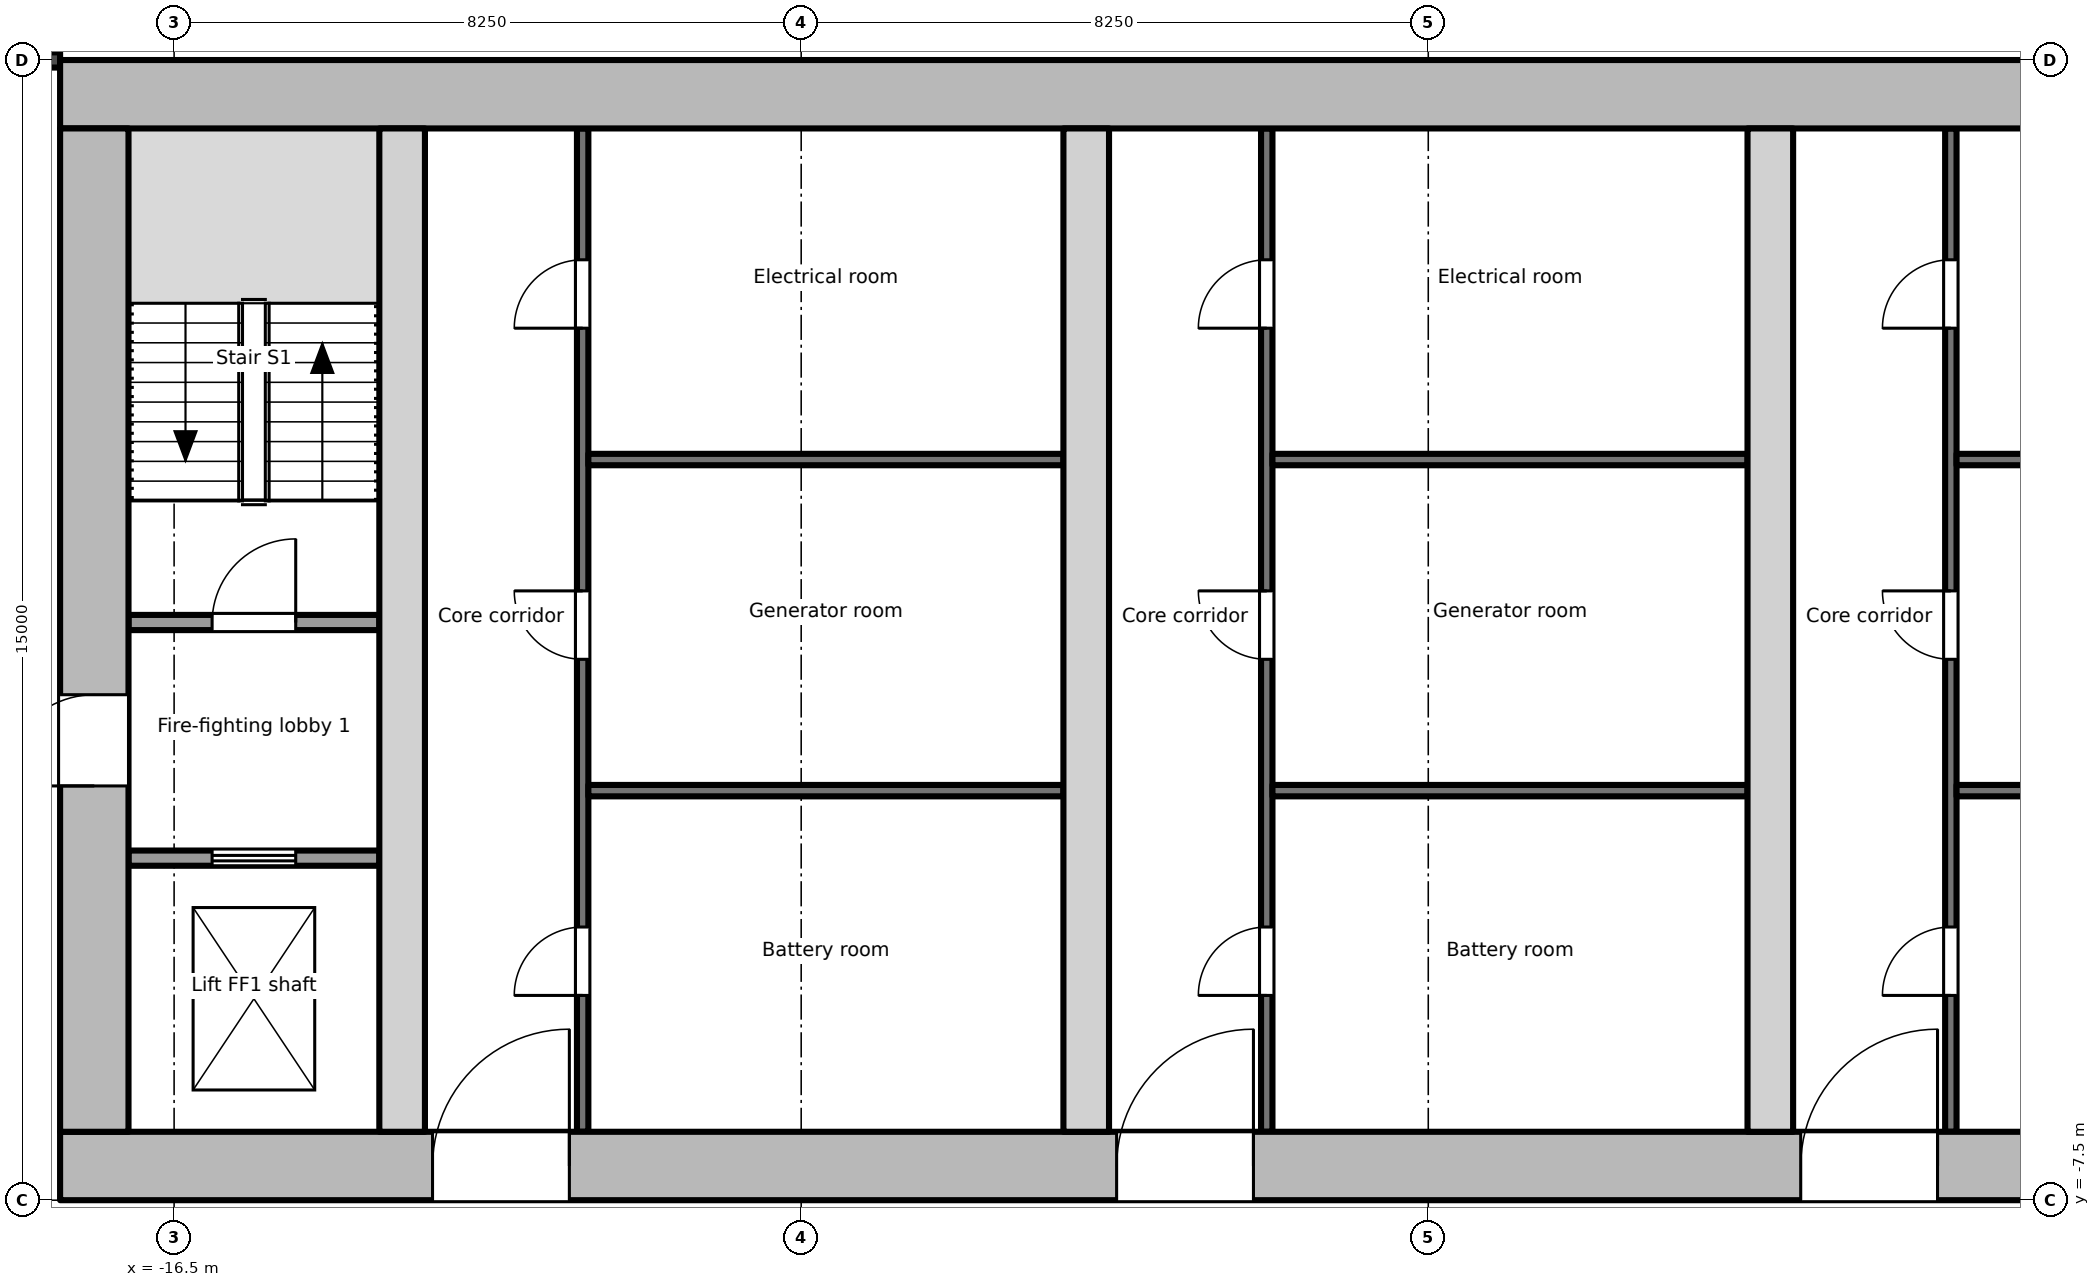
"""IFC4 building model, lengths in metres.
Left out: names, types, materials, properties, quantities, classifications, styles, units other than length and angle.
Written with IfcOpenShell. Run it as: python <this file> out.ifc"""

import sys

from ifc_helpers import new_model, si_unit, direction, frame, frame_2d, origin, place, context, subcontext, project, spatial, rectangle, extrude, element, fill, save


model = new_model("IFC4")
c1 = context("Model", 3, precision=1e-05, world=origin(), true_north=direction((0.0, 1.0)))
c2 = subcontext(c1, "Body", "Model", "MODEL_VIEW")
j1 = project(units=[si_unit("LENGTHUNIT", "METRE"), si_unit("PLANEANGLEUNIT", "RADIAN")], contexts=[c1])
p1 = place(None, origin())
s1 = spatial("IfcSite", under=j1, at=p1, CompositionType="ELEMENT")
p2 = place(p1, origin())
s2 = spatial("IfcBuilding", under=s1, at=p2, CompositionType="ELEMENT")
p3 = place(p2, frame((0.0, 0.0, 312.3)))
s3 = spatial("IfcBuildingStorey", under=s2, at=p3, CompositionType="ELEMENT", Elevation=312.3)
p4 = place(p3, frame((-18.0, -7.05, -0.2), z_axis=(0.0, 0.0, 1.0), x_axis=(1.0, 0.0, 0.0)))
e1 = element("IfcWall", 1, at=p4, inside=s3, PredefinedType="SHEAR", context=c2, shape_type="SweptSolid", body=[
    extrude(rectangle(XDim=36.0, YDim=0.9, at=frame_2d((18.0, 0.0))), origin(), (0.0, 0.0, 1.0), 3.95),
])
p5 = place(p4, frame((4.9, 0.0, 0.2)))
e2 = element("IfcOpeningElement", 2, at=p5, cuts=e1, PredefinedType="OPENING", context=c2, shape_type="SweptSolid", body=[
    extrude(rectangle(XDim=1.8, YDim=2.1, at=frame_2d((0.9, 1.05))), frame((0.0, 0.46, 0.0), z_axis=(0.0, -1.0, 0.0), x_axis=(1.0, 0.0, 0.0)), (0.0, 0.0, 1.0), 0.921),
])
p6 = place(p4, frame((13.9, 0.0, 0.2)))
e3 = element("IfcOpeningElement", 3, at=p6, cuts=e1, PredefinedType="OPENING", context=c2, shape_type="SweptSolid", body=[
    extrude(rectangle(XDim=1.8, YDim=2.1, at=frame_2d((0.9, 1.05))), frame((0.0, 0.46, 0.0), z_axis=(0.0, -1.0, 0.0), x_axis=(1.0, 0.0, 0.0)), (0.0, 0.0, 1.0), 0.921),
])
p7 = place(p4, frame((22.9, 0.0, 0.2)))
e4 = element("IfcOpeningElement", 4, at=p7, cuts=e1, PredefinedType="OPENING", context=c2, shape_type="SweptSolid", body=[
    extrude(rectangle(XDim=1.8, YDim=2.1, at=frame_2d((0.9, 1.05))), frame((0.0, 0.46, 0.0), z_axis=(0.0, -1.0, 0.0), x_axis=(1.0, 0.0, 0.0)), (0.0, 0.0, 1.0), 0.921),
])
p8 = place(p3, frame((-18.0, 7.05, -0.2), z_axis=(0.0, 0.0, 1.0), x_axis=(1.0, 0.0, 0.0)))
e5 = element("IfcWall", 5, at=p8, inside=s3, PredefinedType="SHEAR", context=c2, shape_type="SweptSolid", body=[
    extrude(rectangle(XDim=36.0, YDim=0.9, at=frame_2d((18.0, 0.0))), origin(), (0.0, 0.0, 1.0), 3.95),
])
p9 = place(p3, frame((-17.55, -6.6, -0.2), z_axis=(0.0, 0.0, 1.0), x_axis=(0.0, 1.0, 0.0)))
e6 = element("IfcWall", 6, at=p9, inside=s3, PredefinedType="SHEAR", context=c2, shape_type="SweptSolid", body=[
    extrude(rectangle(XDim=13.2, YDim=0.9, at=frame_2d((6.6, 0.0))), origin(), (0.0, 0.0, 1.0), 3.95),
])
p10 = place(p9, frame((4.55, 0.0, 0.2)))
e7 = element("IfcOpeningElement", 7, at=p10, cuts=e6, PredefinedType="OPENING", context=c2, shape_type="SweptSolid", body=[
    extrude(rectangle(XDim=1.2, YDim=2.1, at=frame_2d((0.6, 1.05))), frame((0.0, 0.46, 0.0), z_axis=(0.0, -1.0, 0.0), x_axis=(1.0, 0.0, 0.0)), (0.0, 0.0, 1.0), 0.921),
])
for number, where, z_axis, x_axis in (
    (8, (-13.5, -6.6, -0.2), (0.0, 0.0, 1.0), (0.0, 1.0, 0.0)),
    (9, (-4.5, -6.6, -0.2), (0.0, 0.0, 1.0), (0.0, 1.0, 0.0)),
    (10, (4.5, -6.6, -0.2), (0.0, 0.0, 1.0), (0.0, 1.0, 0.0)),
):
    element("IfcWall", number, at=place(p3, frame(where, z_axis=z_axis, x_axis=x_axis)), inside=s3, PredefinedType="SHEAR", context=c2, shape_type="SweptSolid", body=[
        extrude(rectangle(XDim=13.2, YDim=0.6, at=frame_2d((6.6, 0.0))), origin(), (0.0, 0.0, 1.0), 3.95),
    ])
p11 = place(p3, frame((-17.1, -3.0, 0.0), z_axis=(0.0, 0.0, 1.0), x_axis=(1.0, 0.0, 0.0)))
e11 = element("IfcWall", 11, at=p11, inside=s3, PredefinedType="PARTITIONING", context=c2, shape_type="SweptSolid", body=[
    extrude(rectangle(XDim=3.3, YDim=0.2, at=frame_2d((1.65, 0.0))), origin(), (0.0, 0.0, 1.0), 3.75),
])
p12 = place(p11, frame((1.1, 0.0, 0.0)))
e12 = element("IfcOpeningElement", 12, at=p12, cuts=e11, PredefinedType="OPENING", context=c2, shape_type="SweptSolid", body=[
    extrude(rectangle(XDim=1.1, YDim=2.1, at=frame_2d((0.55, 1.05))), frame((0.0, 0.111, 0.0), z_axis=(0.0, -1.0, 0.0), x_axis=(1.0, 0.0, 0.0)), (0.0, 0.0, 1.0), 0.221),
])
p13 = place(p3, frame((-17.1, 0.1, 0.0), z_axis=(0.0, 0.0, 1.0), x_axis=(1.0, 0.0, 0.0)))
e13 = element("IfcWall", 13, at=p13, inside=s3, PredefinedType="PARTITIONING", context=c2, shape_type="SweptSolid", body=[
    extrude(rectangle(XDim=3.3, YDim=0.2, at=frame_2d((1.65, 0.0))), origin(), (0.0, 0.0, 1.0), 3.75),
])
p14 = place(p13, frame((1.1, 0.0, 0.0)))
e14 = element("IfcOpeningElement", 14, at=p14, cuts=e13, PredefinedType="OPENING", context=c2, shape_type="SweptSolid", body=[
    extrude(rectangle(XDim=1.1, YDim=2.1, at=frame_2d((0.55, 1.05))), frame((0.0, 0.111, 0.0), z_axis=(0.0, -1.0, 0.0), x_axis=(1.0, 0.0, 0.0)), (0.0, 0.0, 1.0), 0.221),
])
p15 = place(p3, frame((-11.125, -6.6, 0.0), z_axis=(0.0, 0.0, 1.0), x_axis=(0.0, 1.0, 0.0)))
e15 = element("IfcWall", 15, at=p15, inside=s3, PredefinedType="PARTITIONING", context=c2, shape_type="SweptSolid", body=[
    extrude(rectangle(XDim=13.2, YDim=0.15, at=frame_2d((6.6, 0.0))), origin(), (0.0, 0.0, 1.0), 3.75),
])
p16 = place(p15, frame((1.794, 0.0, 0.0)))
e16 = element("IfcOpeningElement", 16, at=p16, cuts=e15, PredefinedType="OPENING", context=c2, shape_type="SweptSolid", body=[
    extrude(rectangle(XDim=0.9, YDim=2.1, at=frame_2d((0.45, 1.05))), frame((0.0, 0.085, 0.0), z_axis=(0.0, -1.0, 0.0), x_axis=(1.0, 0.0, 0.0)), (0.0, 0.0, 1.0), 0.171),
])
p17 = place(p15, frame((6.216, 0.0, 0.0)))
e17 = element("IfcOpeningElement", 17, at=p17, cuts=e15, PredefinedType="OPENING", context=c2, shape_type="SweptSolid", body=[
    extrude(rectangle(XDim=0.9, YDim=2.1, at=frame_2d((0.45, 1.05))), frame((0.0, 0.085, 0.0), z_axis=(0.0, -1.0, 0.0), x_axis=(1.0, 0.0, 0.0)), (0.0, 0.0, 1.0), 0.171),
])
p18 = place(p15, frame((10.572, 0.0, 0.0)))
e18 = element("IfcOpeningElement", 18, at=p18, cuts=e15, PredefinedType="OPENING", context=c2, shape_type="SweptSolid", body=[
    extrude(rectangle(XDim=0.9, YDim=2.1, at=frame_2d((0.45, 1.05))), frame((0.0, 0.085, 0.0), z_axis=(0.0, -1.0, 0.0), x_axis=(1.0, 0.0, 0.0)), (0.0, 0.0, 1.0), 0.171),
])
for number, where, z_axis, x_axis in (
    (19, (-11.05, -2.112, 0.0), (0.0, 0.0, 1.0), (1.0, 0.0, 0.0)),
    (20, (-11.05, 2.244, 0.0), (0.0, 0.0, 1.0), (1.0, 0.0, 0.0)),
):
    element("IfcWall", number, at=place(p3, frame(where, z_axis=z_axis, x_axis=x_axis)), inside=s3, PredefinedType="PARTITIONING", context=c2, shape_type="SweptSolid", body=[
        extrude(rectangle(XDim=6.25, YDim=0.15, at=frame_2d((3.125, 0.0))), origin(), (0.0, 0.0, 1.0), 3.75),
    ])
p19 = place(p3, frame((-2.125, -6.6, 0.0), z_axis=(0.0, 0.0, 1.0), x_axis=(0.0, 1.0, 0.0)))
e21 = element("IfcWall", 21, at=p19, inside=s3, PredefinedType="PARTITIONING", context=c2, shape_type="SweptSolid", body=[
    extrude(rectangle(XDim=13.2, YDim=0.15, at=frame_2d((6.6, 0.0))), origin(), (0.0, 0.0, 1.0), 3.75),
])
p20 = place(p19, frame((1.794, 0.0, 0.0)))
e22 = element("IfcOpeningElement", 22, at=p20, cuts=e21, PredefinedType="OPENING", context=c2, shape_type="SweptSolid", body=[
    extrude(rectangle(XDim=0.9, YDim=2.1, at=frame_2d((0.45, 1.05))), frame((0.0, 0.085, 0.0), z_axis=(0.0, -1.0, 0.0), x_axis=(1.0, 0.0, 0.0)), (0.0, 0.0, 1.0), 0.171),
])
p21 = place(p19, frame((6.216, 0.0, 0.0)))
e23 = element("IfcOpeningElement", 23, at=p21, cuts=e21, PredefinedType="OPENING", context=c2, shape_type="SweptSolid", body=[
    extrude(rectangle(XDim=0.9, YDim=2.1, at=frame_2d((0.45, 1.05))), frame((0.0, 0.085, 0.0), z_axis=(0.0, -1.0, 0.0), x_axis=(1.0, 0.0, 0.0)), (0.0, 0.0, 1.0), 0.171),
])
p22 = place(p19, frame((10.572, 0.0, 0.0)))
e24 = element("IfcOpeningElement", 24, at=p22, cuts=e21, PredefinedType="OPENING", context=c2, shape_type="SweptSolid", body=[
    extrude(rectangle(XDim=0.9, YDim=2.1, at=frame_2d((0.45, 1.05))), frame((0.0, 0.085, 0.0), z_axis=(0.0, -1.0, 0.0), x_axis=(1.0, 0.0, 0.0)), (0.0, 0.0, 1.0), 0.171),
])
for number, where, z_axis, x_axis in (
    (25, (-2.05, -2.112, 0.0), (0.0, 0.0, 1.0), (1.0, 0.0, 0.0)),
    (26, (-2.05, 2.244, 0.0), (0.0, 0.0, 1.0), (1.0, 0.0, 0.0)),
):
    element("IfcWall", number, at=place(p3, frame(where, z_axis=z_axis, x_axis=x_axis)), inside=s3, PredefinedType="PARTITIONING", context=c2, shape_type="SweptSolid", body=[
        extrude(rectangle(XDim=6.25, YDim=0.15, at=frame_2d((3.125, 0.0))), origin(), (0.0, 0.0, 1.0), 3.75),
    ])
p23 = place(p3, frame((6.875, -6.6, 0.0), z_axis=(0.0, 0.0, 1.0), x_axis=(0.0, 1.0, 0.0)))
e27 = element("IfcWall", 27, at=p23, inside=s3, PredefinedType="PARTITIONING", context=c2, shape_type="SweptSolid", body=[
    extrude(rectangle(XDim=13.2, YDim=0.15, at=frame_2d((6.6, 0.0))), origin(), (0.0, 0.0, 1.0), 3.75),
])
p24 = place(p23, frame((1.794, 0.0, 0.0)))
e28 = element("IfcOpeningElement", 28, at=p24, cuts=e27, PredefinedType="OPENING", context=c2, shape_type="SweptSolid", body=[
    extrude(rectangle(XDim=0.9, YDim=2.1, at=frame_2d((0.45, 1.05))), frame((0.0, 0.085, 0.0), z_axis=(0.0, -1.0, 0.0), x_axis=(1.0, 0.0, 0.0)), (0.0, 0.0, 1.0), 0.171),
])
p25 = place(p23, frame((6.216, 0.0, 0.0)))
e29 = element("IfcOpeningElement", 29, at=p25, cuts=e27, PredefinedType="OPENING", context=c2, shape_type="SweptSolid", body=[
    extrude(rectangle(XDim=0.9, YDim=2.1, at=frame_2d((0.45, 1.05))), frame((0.0, 0.085, 0.0), z_axis=(0.0, -1.0, 0.0), x_axis=(1.0, 0.0, 0.0)), (0.0, 0.0, 1.0), 0.171),
])
p26 = place(p23, frame((10.572, 0.0, 0.0)))
e30 = element("IfcOpeningElement", 30, at=p26, cuts=e27, PredefinedType="OPENING", context=c2, shape_type="SweptSolid", body=[
    extrude(rectangle(XDim=0.9, YDim=2.1, at=frame_2d((0.45, 1.05))), frame((0.0, 0.085, 0.0), z_axis=(0.0, -1.0, 0.0), x_axis=(1.0, 0.0, 0.0)), (0.0, 0.0, 1.0), 0.171),
])
for number, where, z_axis, x_axis in (
    (31, (6.95, -2.112, 0.0), (0.0, 0.0, 1.0), (1.0, 0.0, 0.0)),
    (32, (6.95, 2.244, 0.0), (0.0, 0.0, 1.0), (1.0, 0.0, 0.0)),
):
    element("IfcWall", number, at=place(p3, frame(where, z_axis=z_axis, x_axis=x_axis)), inside=s3, PredefinedType="PARTITIONING", context=c2, shape_type="SweptSolid", body=[
        extrude(rectangle(XDim=6.25, YDim=0.15, at=frame_2d((3.125, 0.0))), origin(), (0.0, 0.0, 1.0), 3.75),
    ])
p27 = place(p3, frame((-20.6, 7.501, 0.0), z_axis=(0.0, 0.0, 1.0), x_axis=(1.0, 0.0, 0.0)))
e33 = element("IfcWall", 33, at=p27, inside=s3, PredefinedType="PARTITIONING", context=c2, shape_type="SweptSolid", body=[
    extrude(rectangle(XDim=2.6, YDim=0.2, at=frame_2d((1.3, 0.0))), origin(), (0.0, 0.0, 1.0), 3.75),
])
p28 = place(p12, origin())
e34 = element("IfcDoor", 34, at=p28, inside=s3, OperationType="DOUBLE_DOOR_SLIDING", PredefinedType="DOOR", context=c2, shape_type="SweptSolid", body=[
    extrude(rectangle(XDim=1.1, YDim=2.1, at=frame_2d((0.55, 1.05))), frame((0.0, 0.025, 0.0), z_axis=(0.0, -1.0, 0.0), x_axis=(1.0, 0.0, 0.0)), (0.0, 0.0, 1.0), 0.05),
])
fill(e12, e34)
p29 = place(p10, origin())
e35 = element("IfcDoor", 35, at=p29, inside=s3, OperationType="SINGLE_SWING_LEFT", PredefinedType="DOOR", context=c2, shape_type="SweptSolid", body=[
    extrude(rectangle(XDim=1.2, YDim=2.1, at=frame_2d((0.6, 1.05))), frame((0.0, 0.025, 0.0), z_axis=(0.0, -1.0, 0.0), x_axis=(1.0, 0.0, 0.0)), (0.0, 0.0, 1.0), 0.05),
])
fill(e7, e35)
p30 = place(p14, origin())
e36 = element("IfcDoor", 36, at=p30, inside=s3, OperationType="SINGLE_SWING_RIGHT", PredefinedType="DOOR", context=c2, shape_type="SweptSolid", body=[
    extrude(rectangle(XDim=1.1, YDim=2.1, at=frame_2d((0.55, 1.05))), frame((0.0, 0.025, 0.0), z_axis=(0.0, -1.0, 0.0), x_axis=(1.0, 0.0, 0.0)), (0.0, 0.0, 1.0), 0.05),
])
fill(e14, e36)
p31 = place(p16, origin())
e37 = element("IfcDoor", 37, at=p31, inside=s3, OperationType="SINGLE_SWING_LEFT", PredefinedType="DOOR", context=c2, shape_type="SweptSolid", body=[
    extrude(rectangle(XDim=0.9, YDim=2.1, at=frame_2d((0.45, 1.05))), frame((0.0, 0.025, 0.0), z_axis=(0.0, -1.0, 0.0), x_axis=(1.0, 0.0, 0.0)), (0.0, 0.0, 1.0), 0.05),
])
fill(e16, e37)
p32 = place(p17, origin())
e38 = element("IfcDoor", 38, at=p32, inside=s3, OperationType="SINGLE_SWING_RIGHT", PredefinedType="DOOR", context=c2, shape_type="SweptSolid", body=[
    extrude(rectangle(XDim=0.9, YDim=2.1, at=frame_2d((0.45, 1.05))), frame((0.0, 0.025, 0.0), z_axis=(0.0, -1.0, 0.0), x_axis=(1.0, 0.0, 0.0)), (0.0, 0.0, 1.0), 0.05),
])
fill(e17, e38)
p33 = place(p18, origin())
e39 = element("IfcDoor", 39, at=p33, inside=s3, OperationType="SINGLE_SWING_LEFT", PredefinedType="DOOR", context=c2, shape_type="SweptSolid", body=[
    extrude(rectangle(XDim=0.9, YDim=2.1, at=frame_2d((0.45, 1.05))), frame((0.0, 0.025, 0.0), z_axis=(0.0, -1.0, 0.0), x_axis=(1.0, 0.0, 0.0)), (0.0, 0.0, 1.0), 0.05),
])
fill(e18, e39)
p34 = place(p5, origin())
e40 = element("IfcDoor", 40, at=p34, inside=s3, OperationType="SINGLE_SWING_RIGHT", PredefinedType="DOOR", context=c2, shape_type="SweptSolid", body=[
    extrude(rectangle(XDim=1.8, YDim=2.1, at=frame_2d((0.9, 1.05))), frame((0.0, 0.025, 0.0), z_axis=(0.0, -1.0, 0.0), x_axis=(1.0, 0.0, 0.0)), (0.0, 0.0, 1.0), 0.05),
])
fill(e2, e40)
p35 = place(p20, origin())
e41 = element("IfcDoor", 41, at=p35, inside=s3, OperationType="SINGLE_SWING_LEFT", PredefinedType="DOOR", context=c2, shape_type="SweptSolid", body=[
    extrude(rectangle(XDim=0.9, YDim=2.1, at=frame_2d((0.45, 1.05))), frame((0.0, 0.025, 0.0), z_axis=(0.0, -1.0, 0.0), x_axis=(1.0, 0.0, 0.0)), (0.0, 0.0, 1.0), 0.05),
])
fill(e22, e41)
p36 = place(p21, origin())
e42 = element("IfcDoor", 42, at=p36, inside=s3, OperationType="SINGLE_SWING_RIGHT", PredefinedType="DOOR", context=c2, shape_type="SweptSolid", body=[
    extrude(rectangle(XDim=0.9, YDim=2.1, at=frame_2d((0.45, 1.05))), frame((0.0, 0.025, 0.0), z_axis=(0.0, -1.0, 0.0), x_axis=(1.0, 0.0, 0.0)), (0.0, 0.0, 1.0), 0.05),
])
fill(e23, e42)
p37 = place(p22, origin())
e43 = element("IfcDoor", 43, at=p37, inside=s3, OperationType="SINGLE_SWING_LEFT", PredefinedType="DOOR", context=c2, shape_type="SweptSolid", body=[
    extrude(rectangle(XDim=0.9, YDim=2.1, at=frame_2d((0.45, 1.05))), frame((0.0, 0.025, 0.0), z_axis=(0.0, -1.0, 0.0), x_axis=(1.0, 0.0, 0.0)), (0.0, 0.0, 1.0), 0.05),
])
fill(e24, e43)
p38 = place(p6, origin())
e44 = element("IfcDoor", 44, at=p38, inside=s3, OperationType="SINGLE_SWING_RIGHT", PredefinedType="DOOR", context=c2, shape_type="SweptSolid", body=[
    extrude(rectangle(XDim=1.8, YDim=2.1, at=frame_2d((0.9, 1.05))), frame((0.0, 0.025, 0.0), z_axis=(0.0, -1.0, 0.0), x_axis=(1.0, 0.0, 0.0)), (0.0, 0.0, 1.0), 0.05),
])
fill(e3, e44)
p39 = place(p24, origin())
e45 = element("IfcDoor", 45, at=p39, inside=s3, OperationType="SINGLE_SWING_LEFT", PredefinedType="DOOR", context=c2, shape_type="SweptSolid", body=[
    extrude(rectangle(XDim=0.9, YDim=2.1, at=frame_2d((0.45, 1.05))), frame((0.0, 0.025, 0.0), z_axis=(0.0, -1.0, 0.0), x_axis=(1.0, 0.0, 0.0)), (0.0, 0.0, 1.0), 0.05),
])
fill(e28, e45)
p40 = place(p25, origin())
e46 = element("IfcDoor", 46, at=p40, inside=s3, OperationType="SINGLE_SWING_RIGHT", PredefinedType="DOOR", context=c2, shape_type="SweptSolid", body=[
    extrude(rectangle(XDim=0.9, YDim=2.1, at=frame_2d((0.45, 1.05))), frame((0.0, 0.025, 0.0), z_axis=(0.0, -1.0, 0.0), x_axis=(1.0, 0.0, 0.0)), (0.0, 0.0, 1.0), 0.05),
])
fill(e29, e46)
p41 = place(p26, origin())
e47 = element("IfcDoor", 47, at=p41, inside=s3, OperationType="SINGLE_SWING_LEFT", PredefinedType="DOOR", context=c2, shape_type="SweptSolid", body=[
    extrude(rectangle(XDim=0.9, YDim=2.1, at=frame_2d((0.45, 1.05))), frame((0.0, 0.025, 0.0), z_axis=(0.0, -1.0, 0.0), x_axis=(1.0, 0.0, 0.0)), (0.0, 0.0, 1.0), 0.05),
])
fill(e30, e47)
p42 = place(p7, origin())
e48 = element("IfcDoor", 48, at=p42, inside=s3, OperationType="SINGLE_SWING_RIGHT", PredefinedType="DOOR", context=c2, shape_type="SweptSolid", body=[
    extrude(rectangle(XDim=1.8, YDim=2.1, at=frame_2d((0.9, 1.05))), frame((0.0, 0.025, 0.0), z_axis=(0.0, -1.0, 0.0), x_axis=(1.0, 0.0, 0.0)), (0.0, 0.0, 1.0), 0.05),
])
fill(e4, e48)
save(model, sys.argv[1])
